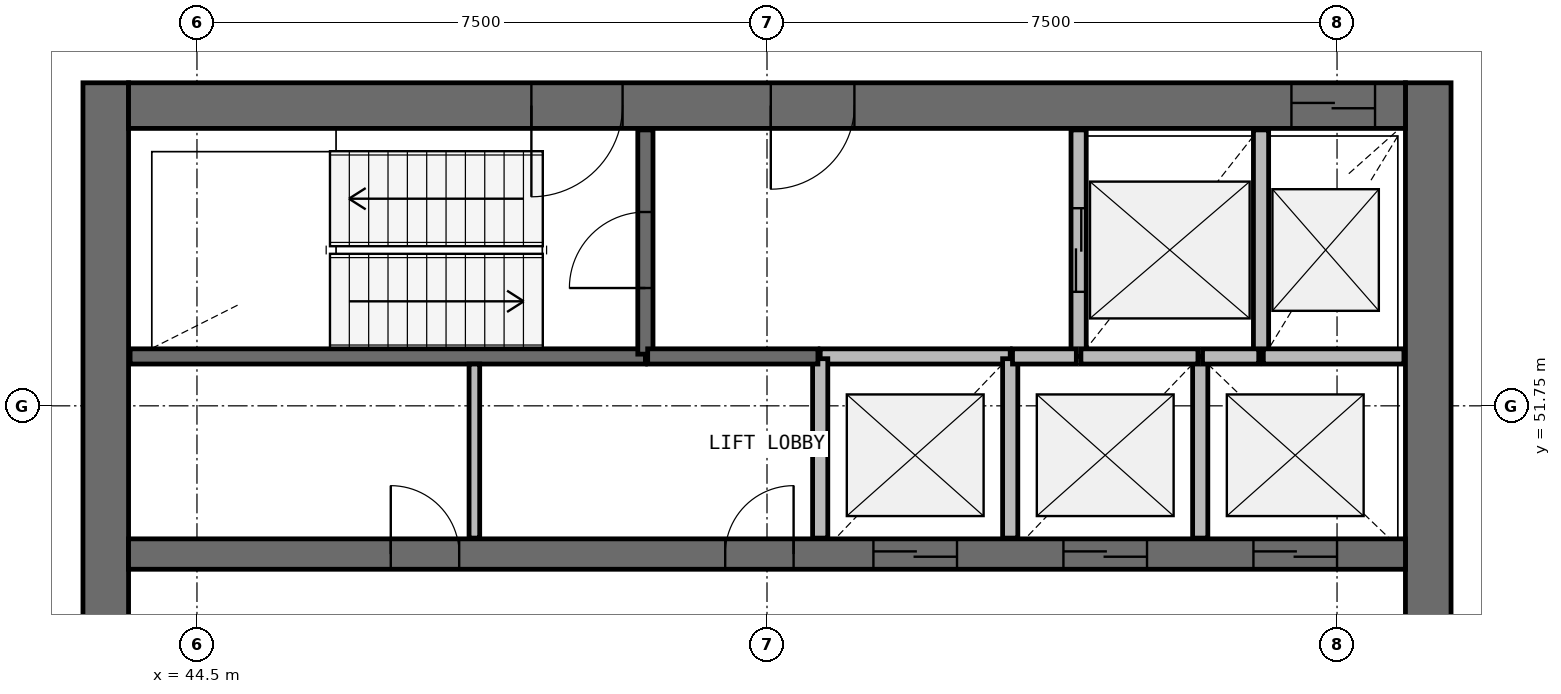
"""IFC4 building model, lengths in metres.
Left out: names, types, materials, properties, quantities, classifications, styles, units other than length and angle.
Written with IfcOpenShell. Run it as: python <this file> out.ifc"""

import sys

from ifc_helpers import new_model, si_unit, direction, frame, frame_2d, origin, place, context, subcontext, project, spatial, rectangle, extrude, source, transform, mapped, element, fill, save


model = new_model("IFC4")
c1 = context("Model", 3, precision=1e-05, world=origin(), true_north=direction((0.0, 1.0)))
c2 = subcontext(c1, "Body", "Model", "MODEL_VIEW")
j1 = project(units=[si_unit("LENGTHUNIT", "METRE"), si_unit("PLANEANGLEUNIT", "RADIAN")], contexts=[c1])
p1 = place(None, origin())
s1 = spatial("IfcSite", under=j1, at=p1, CompositionType="ELEMENT")
p2 = place(p1, origin())
s2 = spatial("IfcBuilding", under=s1, at=p2, CompositionType="ELEMENT")
p3 = place(p2, frame((0.0, 0.0, 226.7)))
s3 = spatial("IfcBuildingStorey", under=s2, at=p3, CompositionType="ELEMENT", Elevation=226.7)
p4 = place(p3, frame((60.7, 40.0, 0.0), z_axis=(0.0, 0.0, 1.0), x_axis=(0.0, 1.0, 0.0)))
e1 = element("IfcWall", 1, at=p4, inside=s3, PredefinedType="SHEAR", context=c2, shape_type="SweptSolid", body=[
    extrude(rectangle(XDim=16.0, YDim=0.6, at=frame_2d((8.0, 0.0))), origin(), (0.0, 0.0, 1.0), 3.9),
])
p5 = place(p4, frame((7.1, 0.0, 0.0)))
e2 = element("IfcOpeningElement", 2, at=p5, cuts=e1, PredefinedType="OPENING", context=c2, shape_type="SweptSolid", body=[
    extrude(rectangle(XDim=1.8, YDim=2.1, at=frame_2d((0.9, 1.05))), frame((0.0, 0.31, 0.0), z_axis=(0.0, -1.0, 0.0), x_axis=(1.0, 0.0, 0.0)), (0.0, 0.0, 1.0), 0.62),
])
p6 = place(p3, frame((43.3, 56.0, 0.0), z_axis=(0.0, 0.0, 1.0), x_axis=(0.0, -1.0, 0.0)))
e3 = element("IfcWall", 3, at=p6, inside=s3, PredefinedType="SHEAR", context=c2, shape_type="SweptSolid", body=[
    extrude(rectangle(XDim=16.0, YDim=0.6, at=frame_2d((8.0, 0.0))), origin(), (0.0, 0.0, 1.0), 3.9),
])
p7 = place(p6, frame((7.1, 0.0, 0.0)))
e4 = element("IfcOpeningElement", 4, at=p7, cuts=e3, PredefinedType="OPENING", context=c2, shape_type="SweptSolid", body=[
    extrude(rectangle(XDim=1.8, YDim=2.1, at=frame_2d((0.9, 1.05))), frame((0.0, 0.31, 0.0), z_axis=(0.0, -1.0, 0.0), x_axis=(1.0, 0.0, 0.0)), (0.0, 0.0, 1.0), 0.62),
])
p8 = place(p3, frame((60.4, 55.7, 0.0), z_axis=(0.0, 0.0, 1.0), x_axis=(-1.0, 0.0, 0.0)))
e5 = element("IfcWall", 5, at=p8, inside=s3, PredefinedType="SHEAR", context=c2, shape_type="SweptSolid", body=[
    extrude(rectangle(XDim=16.8, YDim=0.6, at=frame_2d((8.4, 0.0))), origin(), (0.0, 0.0, 1.0), 3.9),
])
p9 = place(p8, frame((0.4, 0.0, 0.0)))
e6 = element("IfcOpeningElement", 6, at=p9, cuts=e5, PredefinedType="OPENING", context=c2, shape_type="SweptSolid", body=[
    extrude(rectangle(XDim=1.1, YDim=2.1, at=frame_2d((0.55, 1.05))), frame((0.0, 0.31, 0.0), z_axis=(0.0, -1.0, 0.0), x_axis=(1.0, 0.0, 0.0)), (0.0, 0.0, 1.0), 0.62),
])
p10 = place(p8, frame((10.3, 0.0, 0.0)))
e7 = element("IfcOpeningElement", 7, at=p10, cuts=e5, PredefinedType="OPENING", context=c2, shape_type="SweptSolid", body=[
    extrude(rectangle(XDim=1.2, YDim=2.1, at=frame_2d((0.6, 1.05))), frame((0.0, 0.31, 0.0), z_axis=(0.0, -1.0, 0.0), x_axis=(1.0, 0.0, 0.0)), (0.0, 0.0, 1.0), 0.62),
])
p11 = place(p8, frame((7.25, 0.0, 0.0)))
e8 = element("IfcOpeningElement", 8, at=p11, cuts=e5, PredefinedType="OPENING", context=c2, shape_type="SweptSolid", body=[
    extrude(rectangle(XDim=1.1, YDim=2.1, at=frame_2d((0.55, 1.05))), frame((0.0, 0.31, 0.0), z_axis=(0.0, -1.0, 0.0), x_axis=(1.0, 0.0, 0.0)), (0.0, 0.0, 1.0), 0.62),
])
p12 = place(p3, frame((43.6, 49.8, 0.0), z_axis=(0.0, 0.0, 1.0), x_axis=(1.0, 0.0, 0.0)))
e9 = element("IfcWall", 9, at=p12, inside=s3, PredefinedType="SHEAR", context=c2, shape_type="SweptSolid", body=[
    extrude(rectangle(XDim=16.8, YDim=0.4, at=frame_2d((8.4, 0.0))), origin(), (0.0, 0.0, 1.0), 3.9),
])
p13 = place(p12, frame((9.8, 0.0, 0.0)))
e10 = element("IfcOpeningElement", 10, at=p13, cuts=e9, PredefinedType="OPENING", context=c2, shape_type="SweptSolid", body=[
    extrude(rectangle(XDim=1.1, YDim=2.1, at=frame_2d((0.55, 1.05))), frame((0.0, 0.21, 0.0), z_axis=(0.0, -1.0, 0.0), x_axis=(1.0, 0.0, 0.0)), (0.0, 0.0, 1.0), 0.42),
])
p14 = place(p12, frame((12.3, 0.0, 0.0)))
e11 = element("IfcOpeningElement", 11, at=p14, cuts=e9, PredefinedType="OPENING", context=c2, shape_type="SweptSolid", body=[
    extrude(rectangle(XDim=1.1, YDim=2.1, at=frame_2d((0.55, 1.05))), frame((0.0, 0.21, 0.0), z_axis=(0.0, -1.0, 0.0), x_axis=(1.0, 0.0, 0.0)), (0.0, 0.0, 1.0), 0.42),
])
p15 = place(p12, frame((14.8, 0.0, 0.0)))
e12 = element("IfcOpeningElement", 12, at=p15, cuts=e9, PredefinedType="OPENING", context=c2, shape_type="SweptSolid", body=[
    extrude(rectangle(XDim=1.1, YDim=2.1, at=frame_2d((0.55, 1.05))), frame((0.0, 0.21, 0.0), z_axis=(0.0, -1.0, 0.0), x_axis=(1.0, 0.0, 0.0)), (0.0, 0.0, 1.0), 0.42),
])
p16 = place(p12, frame((3.45, 0.0, 0.0)))
e13 = element("IfcOpeningElement", 13, at=p16, cuts=e9, PredefinedType="OPENING", context=c2, shape_type="SweptSolid", body=[
    extrude(rectangle(XDim=0.9, YDim=2.1, at=frame_2d((0.45, 1.05))), frame((0.0, 0.21, 0.0), z_axis=(0.0, -1.0, 0.0), x_axis=(1.0, 0.0, 0.0)), (0.0, 0.0, 1.0), 0.42),
])
p17 = place(p12, frame((7.85, 0.0, 0.0)))
e14 = element("IfcOpeningElement", 14, at=p17, cuts=e9, PredefinedType="OPENING", context=c2, shape_type="SweptSolid", body=[
    extrude(rectangle(XDim=0.9, YDim=2.1, at=frame_2d((0.45, 1.05))), frame((0.0, 0.21, 0.0), z_axis=(0.0, -1.0, 0.0), x_axis=(1.0, 0.0, 0.0)), (0.0, 0.0, 1.0), 0.42),
])
p18 = place(p3, frame((43.62, 52.4, 0.0), z_axis=(0.0, 0.0, 1.0), x_axis=(1.0, 0.0, 0.0)))
e15 = element("IfcWall", 15, at=p18, inside=s3, PredefinedType="SOLIDWALL", context=c2, shape_type="SweptSolid", body=[
    extrude(rectangle(XDim=6.78, YDim=0.2, at=frame_2d((3.39, 0.0))), origin(), (0.0, 0.0, 1.0), 3.4),
])
p19 = place(p3, frame((50.4, 52.43, 0.0), z_axis=(0.0, 0.0, 1.0), x_axis=(0.0, 1.0, 0.0)))
e16 = element("IfcWall", 16, at=p19, inside=s3, PredefinedType="SOLIDWALL", context=c2, shape_type="SweptSolid", body=[
    extrude(rectangle(XDim=2.95, YDim=0.2, at=frame_2d((1.475, 0.0))), origin(), (0.0, 0.0, 1.0), 3.4),
])
p20 = place(p19, frame((0.87, 0.0, 0.0)))
e17 = element("IfcOpeningElement", 17, at=p20, cuts=e16, PredefinedType="OPENING", context=c2, shape_type="SweptSolid", body=[
    extrude(rectangle(XDim=1.0, YDim=2.1, at=frame_2d((0.5, 1.05))), frame((0.0, 0.11, 0.0), z_axis=(0.0, -1.0, 0.0), x_axis=(1.0, 0.0, 0.0)), (0.0, 0.0, 1.0), 0.22),
])
p21 = place(p3, frame((56.1, 55.38, 0.0), z_axis=(0.0, 0.0, 1.0), x_axis=(0.0, -1.0, 0.0)))
e18 = element("IfcWall", 18, at=p21, inside=s3, PredefinedType="SOLIDWALL", context=c2, shape_type="SweptSolid", body=[
    extrude(rectangle(XDim=2.98, YDim=0.2, at=frame_2d((1.49, 0.0))), origin(), (0.0, 0.0, 1.0), 3.4),
])
p22 = place(p21, frame((1.03, 0.0, 0.0)))
e19 = element("IfcOpeningElement", 19, at=p22, cuts=e18, PredefinedType="OPENING", context=c2, shape_type="SweptSolid", body=[
    extrude(rectangle(XDim=1.1, YDim=2.1, at=frame_2d((0.55, 1.05))), frame((0.0, 0.11, 0.0), z_axis=(0.0, -1.0, 0.0), x_axis=(1.0, 0.0, 0.0)), (0.0, 0.0, 1.0), 0.22),
])
p23 = place(p3, frame((58.5, 52.4, 0.0), z_axis=(0.0, 0.0, 1.0), x_axis=(0.0, 1.0, 0.0)))
e20 = element("IfcWall", 20, at=p23, inside=s3, PredefinedType="SOLIDWALL", context=c2, shape_type="SweptSolid", body=[
    extrude(rectangle(XDim=2.98, YDim=0.2, at=frame_2d((1.49, 0.0))), origin(), (0.0, 0.0, 1.0), 3.4),
])
p24 = place(p3, frame((55.2, 52.4, 0.0), z_axis=(0.0, 0.0, 1.0), x_axis=(-1.0, 0.0, 0.0)))
e21 = element("IfcWall", 21, at=p24, inside=s3, PredefinedType="SOLIDWALL", context=c2, shape_type="SweptSolid", body=[
    extrude(rectangle(XDim=2.5, YDim=0.2, at=frame_2d((1.25, 0.0))), origin(), (0.0, 0.0, 1.0), 3.4),
])
for number, where, z_axis, x_axis in (
    (22, (52.7, 52.37, 0.0), (0.0, 0.0, 1.0), (0.0, -1.0, 0.0)),
    (23, (55.2, 50.01, 0.0), (0.0, 0.0, 1.0), (0.0, 1.0, 0.0)),
):
    element("IfcWall", number, at=place(p3, frame(where, z_axis=z_axis, x_axis=x_axis)), inside=s3, PredefinedType="SOLIDWALL", context=c2, shape_type="SweptSolid", body=[
        extrude(rectangle(XDim=2.36, YDim=0.2, at=frame_2d((1.18, 0.0))), origin(), (0.0, 0.0, 1.0), 3.4),
    ])
p25 = place(p3, frame((57.7, 50.01, 0.0), z_axis=(0.0, 0.0, 1.0), x_axis=(0.0, 1.0, 0.0)))
e24 = element("IfcWall", 24, at=p25, inside=s3, PredefinedType="SOLIDWALL", context=c2, shape_type="SweptSolid", body=[
    extrude(rectangle(XDim=2.39, YDim=0.2, at=frame_2d((1.195, 0.0))), origin(), (0.0, 0.0, 1.0), 3.4),
])
p26 = place(p3, frame((50.43, 52.4, 0.0), z_axis=(0.0, 0.0, 1.0), x_axis=(1.0, 0.0, 0.0)))
e25 = element("IfcWall", 25, at=p26, inside=s3, PredefinedType="SOLIDWALL", context=c2, shape_type="SweptSolid", body=[
    extrude(rectangle(XDim=2.24, YDim=0.2, at=frame_2d((1.12, 0.0))), origin(), (0.0, 0.0, 1.0), 3.4),
])
p27 = place(p3, frame((60.38, 52.4, 0.0), z_axis=(0.0, 0.0, 1.0), x_axis=(-1.0, 0.0, 0.0)))
e26 = element("IfcWall", 26, at=p27, inside=s3, PredefinedType="SOLIDWALL", context=c2, shape_type="SweptSolid", body=[
    extrude(rectangle(XDim=1.85, YDim=0.2, at=frame_2d((0.925, 0.0))), origin(), (0.0, 0.0, 1.0), 3.4),
])
p28 = place(p3, frame((57.67, 52.4, 0.0), z_axis=(0.0, 0.0, 1.0), x_axis=(-1.0, 0.0, 0.0)))
e27 = element("IfcWall", 27, at=p28, inside=s3, PredefinedType="SOLIDWALL", context=c2, shape_type="SweptSolid", body=[
    extrude(rectangle(XDim=1.54, YDim=0.2, at=frame_2d((0.77, 0.0))), origin(), (0.0, 0.0, 1.0), 3.4),
])
p29 = place(p3, frame((56.07, 52.4, 0.0), z_axis=(0.0, 0.0, 1.0), x_axis=(-1.0, 0.0, 0.0)))
e28 = element("IfcWall", 28, at=p29, inside=s3, PredefinedType="SOLIDWALL", context=c2, shape_type="SweptSolid", body=[
    extrude(rectangle(XDim=0.84, YDim=0.2, at=frame_2d((0.42, 0.0))), origin(), (0.0, 0.0, 1.0), 3.4),
])
p30 = place(p3, frame((58.47, 52.4, 0.0), z_axis=(0.0, 0.0, 1.0), x_axis=(-1.0, 0.0, 0.0)))
e29 = element("IfcWall", 29, at=p30, inside=s3, PredefinedType="SOLIDWALL", context=c2, shape_type="SweptSolid", body=[
    extrude(rectangle(XDim=0.74, YDim=0.2, at=frame_2d((0.37, 0.0))), origin(), (0.0, 0.0, 1.0), 3.4),
])
p31 = place(p3, frame((48.15, 50.01, 0.0), z_axis=(0.0, 0.0, 1.0), x_axis=(0.0, 1.0, 0.0)))
e30 = element("IfcWall", 30, at=p31, inside=s3, PredefinedType="PARTITIONING", context=c2, shape_type="SweptSolid", body=[
    extrude(rectangle(XDim=2.29, YDim=0.14, at=frame_2d((1.145, 0.0))), origin(), (0.0, 0.0, 1.0), 2.7),
])
m1 = source(origin(), c2, "Body", "SweptSolid", [
    extrude(rectangle(XDim=1.1, YDim=2.1, at=frame_2d((0.55, 1.05))), frame((0.0, 0.025, 0.0), z_axis=(0.0, -1.0, 0.0), x_axis=(1.0, 0.0, 0.0)), (0.0, 0.0, 1.0), 0.05),
])
p32 = place(p13, origin())
e31 = element("IfcDoor", 31, at=p32, inside=s3, OperationType="DOUBLE_DOOR_SLIDING", PredefinedType="USERDEFINED", context=c2, shape_type="MappedRepresentation", body=[
    mapped(m1, transform((0.0, 0.0, 0.0), scale=1.0)),
])
fill(e10, e31)
p33 = place(p14, origin())
e32 = element("IfcDoor", 32, at=p33, inside=s3, OperationType="DOUBLE_DOOR_SLIDING", PredefinedType="USERDEFINED", context=c2, shape_type="MappedRepresentation", body=[
    mapped(m1, transform((0.0, 0.0, 0.0), scale=1.0)),
])
fill(e11, e32)
p34 = place(p15, origin())
e33 = element("IfcDoor", 33, at=p34, inside=s3, OperationType="DOUBLE_DOOR_SLIDING", PredefinedType="USERDEFINED", context=c2, shape_type="MappedRepresentation", body=[
    mapped(m1, transform((0.0, 0.0, 0.0), scale=1.0)),
])
fill(e12, e33)
p35 = place(p22, origin())
e34 = element("IfcDoor", 34, at=p35, inside=s3, OperationType="DOUBLE_DOOR_SLIDING", PredefinedType="USERDEFINED", context=c2, shape_type="MappedRepresentation", body=[
    mapped(m1, transform((0.0, 0.0, 0.0), scale=1.0)),
])
fill(e19, e34)
p36 = place(p9, origin())
e35 = element("IfcDoor", 35, at=p36, inside=s3, OperationType="DOUBLE_DOOR_SLIDING", PredefinedType="USERDEFINED", context=c2, shape_type="MappedRepresentation", body=[
    mapped(m1, transform((0.0, 0.0, 0.0), scale=1.0)),
])
fill(e6, e35)
m2 = source(origin(), c2, "Body", "SweptSolid", [
    extrude(rectangle(XDim=1.2, YDim=2.1, at=frame_2d((0.6, 1.05))), frame((0.0, 0.025, 0.0), z_axis=(0.0, -1.0, 0.0), x_axis=(1.0, 0.0, 0.0)), (0.0, 0.0, 1.0), 0.05),
])
p37 = place(p10, origin())
e36 = element("IfcDoor", 36, at=p37, inside=s3, OperationType="SINGLE_SWING_RIGHT", PredefinedType="DOOR", context=c2, shape_type="MappedRepresentation", body=[
    mapped(m2, transform((0.0, 0.0, 0.0), scale=1.0)),
])
fill(e7, e36)
m3 = source(origin(), c2, "Body", "SweptSolid", [
    extrude(rectangle(XDim=1.0, YDim=2.1, at=frame_2d((0.5, 1.05))), frame((0.0, 0.025, 0.0), z_axis=(0.0, -1.0, 0.0), x_axis=(1.0, 0.0, 0.0)), (0.0, 0.0, 1.0), 0.05),
])
p38 = place(p20, origin())
e37 = element("IfcDoor", 37, at=p38, inside=s3, OperationType="SINGLE_SWING_LEFT", PredefinedType="DOOR", context=c2, shape_type="MappedRepresentation", body=[
    mapped(m3, transform((0.0, 0.0, 0.0), scale=1.0)),
])
fill(e17, e37)
m4 = source(origin(), c2, "Body", "SweptSolid", [
    extrude(rectangle(XDim=1.1, YDim=2.1, at=frame_2d((0.55, 1.05))), frame((0.0, 0.025, 0.0), z_axis=(0.0, -1.0, 0.0), x_axis=(1.0, 0.0, 0.0)), (0.0, 0.0, 1.0), 0.05),
])
p39 = place(p11, origin())
e38 = element("IfcDoor", 38, at=p39, inside=s3, OperationType="SINGLE_SWING_RIGHT", PredefinedType="DOOR", context=c2, shape_type="MappedRepresentation", body=[
    mapped(m4, transform((0.0, 0.0, 0.0), scale=1.0)),
])
fill(e8, e38)
m5 = source(origin(), c2, "Body", "SweptSolid", [
    extrude(rectangle(XDim=0.9, YDim=2.1, at=frame_2d((0.45, 1.05))), frame((0.0, 0.025, 0.0), z_axis=(0.0, -1.0, 0.0), x_axis=(1.0, 0.0, 0.0)), (0.0, 0.0, 1.0), 0.05),
])
p40 = place(p16, origin())
e39 = element("IfcDoor", 39, at=p40, inside=s3, OperationType="SINGLE_SWING_LEFT", PredefinedType="DOOR", context=c2, shape_type="MappedRepresentation", body=[
    mapped(m5, transform((0.0, 0.0, 0.0), scale=1.0)),
])
fill(e13, e39)
p41 = place(p17, origin())
e40 = element("IfcDoor", 40, at=p41, inside=s3, OperationType="SINGLE_SWING_RIGHT", PredefinedType="DOOR", context=c2, shape_type="MappedRepresentation", body=[
    mapped(m5, transform((0.0, 0.0, 0.0), scale=1.0)),
])
fill(e14, e40)
save(model, sys.argv[1])
